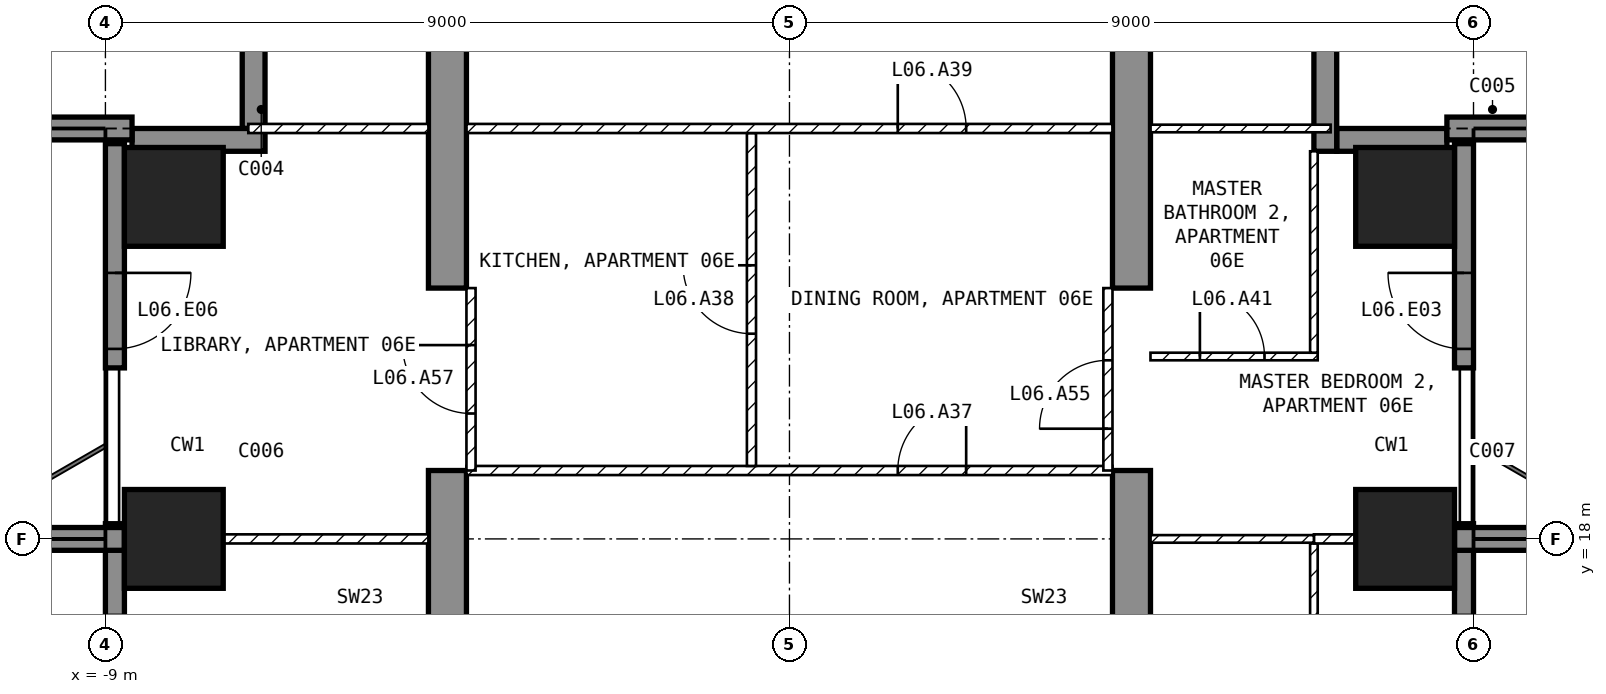
"""IFC4 building model, lengths in metres.
Left out: names, types, materials, properties, quantities, classifications, styles, units other than length and angle.
Written with IfcOpenShell. Run it as: python <this file> out.ifc"""

import sys

from ifc_helpers import new_model, si_unit, direction, frame, frame_2d, origin, origin_2d, place, context, subcontext, project, spatial, polyline, rectangle, outline, extrude, element, fill, save


model = new_model("IFC4")
c1 = context("Model", 3, precision=1e-05, world=origin(), true_north=direction((0.0, 1.0)))
c2 = subcontext(c1, "Body", "Model", "MODEL_VIEW")
j1 = project(units=[si_unit("LENGTHUNIT", "METRE"), si_unit("PLANEANGLEUNIT", "RADIAN")], contexts=[c1])
p1 = place(None, origin())
s1 = spatial("IfcSite", under=j1, at=p1, CompositionType="ELEMENT")
p2 = place(p1, origin())
s2 = spatial("IfcBuilding", under=s1, at=p2, CompositionType="ELEMENT")
p3 = place(p2, frame((0.0, 0.0, 40.0)))
s3 = spatial("IfcBuildingStorey", under=s2, at=p3, CompositionType="ELEMENT", Elevation=40.0)
for number, where, z_axis, x_axis in (
    (1, (-8.1, 18.0, -0.25), (0.0, 0.0, 1.0), (1.0, 0.0, 0.0)),
    (2, (-8.1, 22.5, -0.25), (0.0, 0.0, 1.0), (1.0, 0.0, 0.0)),
    (3, (8.1, 18.0, -0.25), (0.0, 0.0, 1.0), (1.0, 0.0, 0.0)),
    (4, (8.1, 22.5, -0.25), (0.0, 0.0, 1.0), (1.0, 0.0, 0.0)),
):
    element("IfcColumn", number, at=place(p3, frame(where, z_axis=z_axis, x_axis=x_axis)), inside=s3, PredefinedType="COLUMN", context=c2, shape_type="SweptSolid", body=[
        extrude(rectangle(XDim=1.3, YDim=1.3, at=origin_2d()), origin(), (0.0, 0.0, 1.0), 3.5),
    ])
for number, where, z_axis, x_axis in (
    (5, (-4.75, 9.0, -0.25), (1.0, 0.0, 0.0), (0.0, 1.0, 0.0)),
    (6, (4.25, 9.0, -0.25), (1.0, 0.0, 0.0), (0.0, 1.0, 0.0)),
):
    element("IfcWall", number, at=place(p3, frame(where, z_axis=z_axis, x_axis=x_axis)), inside=s3, PredefinedType="SHEAR", context=c2, shape_type="SweptSolid", body=[
        extrude(outline(polyline([(0.0, 0.0), (2.1, 0.0), (2.1, 2.65), (4.5, 2.65), (4.5, 0.0), (9.9, 0.0), (9.9, 2.65), (12.3, 2.65), (12.3, 0.0), (16.45, 0.0), (16.45, 3.5), (0.0, 3.5), (0.0, 0.0)])), origin(), (0.0, 0.0, 1.0), 0.5),
    ])
p4 = place(p3, frame((8.875, 15.55, 0.0), z_axis=(0.0, 0.0, 1.0), x_axis=(0.0, 1.0, 0.0)))
e7 = element("IfcWall", 7, at=p4, inside=s3, PredefinedType="SOLIDWALL", context=c2, shape_type="SweptSolid", body=[
    extrude(rectangle(XDim=2.65, YDim=0.25, at=frame_2d((1.325, 0.0))), origin(), (0.0, 0.0, 1.0), 3.25),
])
p5 = place(p4, frame((0.25, 0.0, 0.0)))
e8 = element("IfcOpeningElement", 8, at=p5, cuts=e7, PredefinedType="OPENING", context=c2, shape_type="SweptSolid", body=[
    extrude(rectangle(XDim=1.2, YDim=2.4, at=frame_2d((0.6, 1.2))), frame((0.0, 0.135, 0.0), z_axis=(0.0, -1.0, 0.0), x_axis=(1.0, 0.0, 0.0)), (0.0, 0.0, 1.0), 0.27),
])
p6 = place(p3, frame((8.875, 20.25, 0.0), z_axis=(0.0, 0.0, 1.0), x_axis=(0.0, 1.0, 0.0)))
e9 = element("IfcWall", 9, at=p6, inside=s3, PredefinedType="SOLIDWALL", context=c2, shape_type="SweptSolid", body=[
    extrude(rectangle(XDim=2.95, YDim=0.25, at=frame_2d((1.475, 0.0))), origin(), (0.0, 0.0, 1.0), 3.25),
])
p7 = place(p6, frame((0.25, 0.0, 0.0)))
e10 = element("IfcOpeningElement", 10, at=p7, cuts=e9, PredefinedType="OPENING", context=c2, shape_type="SweptSolid", body=[
    extrude(rectangle(XDim=1.0, YDim=2.4, at=frame_2d((0.5, 1.2))), frame((0.0, 0.135, 0.0), z_axis=(0.0, -1.0, 0.0), x_axis=(1.0, 0.0, 0.0)), (0.0, 0.0, 1.0), 0.27),
])
p8 = place(p3, frame((-8.875, 23.2, 0.0), z_axis=(0.0, 0.0, 1.0), x_axis=(0.0, -1.0, 0.0)))
e11 = element("IfcWall", 11, at=p8, inside=s3, PredefinedType="SOLIDWALL", context=c2, shape_type="SweptSolid", body=[
    extrude(rectangle(XDim=2.95, YDim=0.25, at=frame_2d((1.475, 0.0))), origin(), (0.0, 0.0, 1.0), 3.25),
])
p9 = place(p8, frame((1.7, 0.0, 0.0)))
e12 = element("IfcOpeningElement", 12, at=p9, cuts=e11, PredefinedType="OPENING", context=c2, shape_type="SweptSolid", body=[
    extrude(rectangle(XDim=1.0, YDim=2.4, at=frame_2d((0.5, 1.2))), frame((0.0, 0.135, 0.0), z_axis=(0.0, -1.0, 0.0), x_axis=(1.0, 0.0, 0.0)), (0.0, 0.0, 1.0), 0.27),
])
p10 = place(p3, frame((-8.875, 18.2, 0.0), z_axis=(0.0, 0.0, 1.0), x_axis=(0.0, -1.0, 0.0)))
e13 = element("IfcWall", 13, at=p10, inside=s3, PredefinedType="SOLIDWALL", context=c2, shape_type="SweptSolid", body=[
    extrude(rectangle(XDim=2.65, YDim=0.25, at=frame_2d((1.325, 0.0))), origin(), (0.0, 0.0, 1.0), 3.25),
])
p11 = place(p10, frame((1.2, 0.0, 0.0)))
e14 = element("IfcOpeningElement", 14, at=p11, cuts=e13, PredefinedType="OPENING", context=c2, shape_type="SweptSolid", body=[
    extrude(rectangle(XDim=1.2, YDim=2.4, at=frame_2d((0.6, 1.2))), frame((0.0, 0.135, 0.0), z_axis=(0.0, -1.0, 0.0), x_axis=(1.0, 0.0, 0.0)), (0.0, 0.0, 1.0), 0.27),
])
p12 = place(p3, frame((8.65, 23.25, 0.0), z_axis=(0.0, 0.0, 1.0), x_axis=(-1.0, 0.0, 0.0)))
e15 = element("IfcWall", 15, at=p12, inside=s3, PredefinedType="SOLIDWALL", context=c2, shape_type="SweptSolid", body=[
    extrude(rectangle(XDim=1.45, YDim=0.3, at=frame_2d((0.725, 0.0))), origin(), (0.0, 0.0, 1.0), 3.25),
])
p13 = place(p3, frame((7.05, 23.1, 0.0), z_axis=(0.0, 0.0, 1.0), x_axis=(0.0, 1.0, 0.0)))
e16 = element("IfcWall", 16, at=p13, inside=s3, PredefinedType="SOLIDWALL", context=c2, shape_type="SweptSolid", body=[
    extrude(rectangle(XDim=1.8, YDim=0.3, at=frame_2d((0.9, 0.0))), origin(), (0.0, 0.0, 1.0), 3.25),
])
p14 = place(p3, frame((-7.05, 25.2, 0.0), z_axis=(0.0, 0.0, 1.0), x_axis=(0.0, -1.0, 0.0)))
e17 = element("IfcWall", 17, at=p14, inside=s3, PredefinedType="SOLIDWALL", context=c2, shape_type="SweptSolid", body=[
    extrude(rectangle(XDim=1.8, YDim=0.3, at=frame_2d((0.9, 0.0))), origin(), (0.0, 0.0, 1.0), 3.25),
])
p15 = place(p3, frame((-6.9, 23.25, 0.0), z_axis=(0.0, 0.0, 1.0), x_axis=(-1.0, 0.0, 0.0)))
e18 = element("IfcWall", 18, at=p15, inside=s3, PredefinedType="SOLIDWALL", context=c2, shape_type="SweptSolid", body=[
    extrude(rectangle(XDim=1.75, YDim=0.3, at=frame_2d((0.875, 0.0))), origin(), (0.0, 0.0, 1.0), 3.25),
])
p16 = place(p3, frame((-8.75, 18.0, 0.0), z_axis=(0.0, 0.0, 1.0), x_axis=(-1.0, 0.0, 0.0)))
e19 = element("IfcWall", 19, at=p16, inside=s3, PredefinedType="SOLIDWALL", context=c2, shape_type="SweptSolid", body=[
    extrude(rectangle(XDim=2.95, YDim=0.3, at=frame_2d((1.475, 0.0))), origin(), (0.0, 0.0, 1.0), 3.25),
])
p17 = place(p3, frame((-8.65, 23.4, 0.0), z_axis=(0.0, 0.0, 1.0), x_axis=(-1.0, 0.0, 0.0)))
e20 = element("IfcWall", 20, at=p17, inside=s3, PredefinedType="SOLIDWALL", context=c2, shape_type="SweptSolid", body=[
    extrude(rectangle(XDim=3.05, YDim=0.3, at=frame_2d((1.525, 0.0))), origin(), (0.0, 0.0, 1.0), 3.25),
])
p18 = place(p3, frame((8.75, 18.0, 0.0), z_axis=(0.0, 0.0, 1.0), x_axis=(1.0, 0.0, 0.0)))
e21 = element("IfcWall", 21, at=p18, inside=s3, PredefinedType="SOLIDWALL", context=c2, shape_type="SweptSolid", body=[
    extrude(rectangle(XDim=2.95, YDim=0.3, at=frame_2d((1.475, 0.0))), origin(), (0.0, 0.0, 1.0), 3.25),
])
p19 = place(p3, frame((8.65, 23.4, 0.0), z_axis=(0.0, 0.0, 1.0), x_axis=(1.0, 0.0, 0.0)))
e22 = element("IfcWall", 22, at=p19, inside=s3, PredefinedType="SOLIDWALL", context=c2, shape_type="SweptSolid", body=[
    extrude(rectangle(XDim=3.05, YDim=0.3, at=frame_2d((1.525, 0.0))), origin(), (0.0, 0.0, 1.0), 3.25),
])
p20 = place(p3, frame((-4.25, 18.9, 0.0), z_axis=(0.0, 0.0, 1.0), x_axis=(1.0, 0.0, 0.0)))
e23 = element("IfcWall", 23, at=p20, inside=s3, PredefinedType="PARTITIONING", context=c2, shape_type="SweptSolid", body=[
    extrude(rectangle(XDim=8.5, YDim=0.12, at=frame_2d((4.25, 0.0))), origin(), (0.0, 0.0, 1.0), 3.25),
])
p21 = place(p20, frame((5.675, 0.0, 0.0)))
e24 = element("IfcOpeningElement", 24, at=p21, cuts=e23, PredefinedType="OPENING", context=c2, shape_type="SweptSolid", body=[
    extrude(rectangle(XDim=0.9, YDim=2.1, at=frame_2d((0.45, 1.05))), frame((0.0, 0.07, 0.0), z_axis=(0.0, -1.0, 0.0), x_axis=(1.0, 0.0, 0.0)), (0.0, 0.0, 1.0), 0.14),
])
p22 = place(p3, frame((-0.5, 18.96, 0.0), z_axis=(0.0, 0.0, 1.0), x_axis=(0.0, 1.0, 0.0)))
e25 = element("IfcWall", 25, at=p22, inside=s3, PredefinedType="PARTITIONING", context=c2, shape_type="SweptSolid", body=[
    extrude(rectangle(XDim=4.38, YDim=0.12, at=frame_2d((2.19, 0.0))), origin(), (0.0, 0.0, 1.0), 3.25),
])
p23 = place(p22, frame((1.74, 0.0, 0.0)))
e26 = element("IfcOpeningElement", 26, at=p23, cuts=e25, PredefinedType="OPENING", context=c2, shape_type="SweptSolid", body=[
    extrude(rectangle(XDim=0.9, YDim=2.1, at=frame_2d((0.45, 1.05))), frame((0.0, 0.07, 0.0), z_axis=(0.0, -1.0, 0.0), x_axis=(1.0, 0.0, 0.0)), (0.0, 0.0, 1.0), 0.14),
])
p24 = place(p3, frame((-4.25, 23.4, 0.0), z_axis=(0.0, 0.0, 1.0), x_axis=(1.0, 0.0, 0.0)))
e27 = element("IfcWall", 27, at=p24, inside=s3, PredefinedType="PARTITIONING", context=c2, shape_type="SweptSolid", body=[
    extrude(rectangle(XDim=8.5, YDim=0.12, at=frame_2d((4.25, 0.0))), origin(), (0.0, 0.0, 1.0), 3.25),
])
p25 = place(p24, frame((5.675, 0.0, 0.0)))
e28 = element("IfcOpeningElement", 28, at=p25, cuts=e27, PredefinedType="OPENING", context=c2, shape_type="SweptSolid", body=[
    extrude(rectangle(XDim=0.9, YDim=2.1, at=frame_2d((0.45, 1.05))), frame((0.0, 0.07, 0.0), z_axis=(0.0, -1.0, 0.0), x_axis=(1.0, 0.0, 0.0)), (0.0, 0.0, 1.0), 0.14),
])
p26 = place(p3, frame((6.9, 14.45, 0.0), z_axis=(0.0, 0.0, 1.0), x_axis=(0.0, 1.0, 0.0)))
e29 = element("IfcWall", 29, at=p26, inside=s3, PredefinedType="PARTITIONING", context=c2, shape_type="SweptSolid", body=[
    extrude(rectangle(XDim=3.49, YDim=0.1, at=frame_2d((1.745, 0.0))), origin(), (0.0, 0.0, 1.0), 3.25),
])
p27 = place(p3, frame((6.9, 18.0, 0.0), z_axis=(0.0, 0.0, 1.0), x_axis=(1.0, 0.0, 0.0)))
e30 = element("IfcWall", 30, at=p27, inside=s3, PredefinedType="PARTITIONING", context=c2, shape_type="SweptSolid", body=[
    extrude(rectangle(XDim=0.55, YDim=0.12, at=frame_2d((0.275, 0.0))), origin(), (0.0, 0.0, 1.0), 2.346),
])
p28 = place(p3, frame((4.75, 18.0, 0.0), z_axis=(0.0, 0.0, 1.0), x_axis=(1.0, 0.0, 0.0)))
e31 = element("IfcWall", 31, at=p28, inside=s3, PredefinedType="PARTITIONING", context=c2, shape_type="SweptSolid", body=[
    extrude(rectangle(XDim=2.15, YDim=0.1, at=frame_2d((1.075, 0.0))), origin(), (0.0, 0.0, 1.0), 2.346),
])
p29 = place(p3, frame((4.75, 20.4, 0.0), z_axis=(0.0, 0.0, 1.0), x_axis=(1.0, 0.0, 0.0)))
e32 = element("IfcWall", 32, at=p29, inside=s3, PredefinedType="PARTITIONING", context=c2, shape_type="SweptSolid", body=[
    extrude(rectangle(XDim=2.2, YDim=0.1, at=frame_2d((1.1, 0.0))), origin(), (0.0, 0.0, 1.0), 3.25),
])
p30 = place(p29, frame((0.65, 0.0, 0.0)))
e33 = element("IfcOpeningElement", 33, at=p30, cuts=e32, PredefinedType="OPENING", context=c2, shape_type="SweptSolid", body=[
    extrude(rectangle(XDim=0.85, YDim=2.1, at=frame_2d((0.425, 1.05))), frame((0.0, 0.06, 0.0), z_axis=(0.0, -1.0, 0.0), x_axis=(1.0, 0.0, 0.0)), (0.0, 0.0, 1.0), 0.12),
])
p31 = place(p3, frame((6.9, 20.45, 0.0), z_axis=(0.0, 0.0, 1.0), x_axis=(0.0, 1.0, 0.0)))
e34 = element("IfcWall", 34, at=p31, inside=s3, PredefinedType="PARTITIONING", context=c2, shape_type="SweptSolid", body=[
    extrude(rectangle(XDim=2.65, YDim=0.1, at=frame_2d((1.325, 0.0))), origin(), (0.0, 0.0, 1.0), 3.25),
])
p32 = place(p3, frame((4.75, 23.4, 0.0), z_axis=(0.0, 0.0, 1.0), x_axis=(1.0, 0.0, 0.0)))
e35 = element("IfcWall", 35, at=p32, inside=s3, PredefinedType="PARTITIONING", context=c2, shape_type="SweptSolid", body=[
    extrude(rectangle(XDim=2.37, YDim=0.1, at=frame_2d((1.185, 0.0))), origin(), (0.0, 0.0, 1.0), 3.25),
])
p33 = place(p3, frame((-7.45, 18.0, 0.0), z_axis=(0.0, 0.0, 1.0), x_axis=(1.0, 0.0, 0.0)))
e36 = element("IfcWall", 36, at=p33, inside=s3, PredefinedType="PARTITIONING", context=c2, shape_type="SweptSolid", body=[
    extrude(rectangle(XDim=2.7, YDim=0.12, at=frame_2d((1.35, 0.0))), origin(), (0.0, 0.0, 1.0), 2.346),
])
p34 = place(p3, frame((-7.12, 23.4, 0.0), z_axis=(0.0, 0.0, 1.0), x_axis=(1.0, 0.0, 0.0)))
e37 = element("IfcWall", 37, at=p34, inside=s3, PredefinedType="PARTITIONING", context=c2, shape_type="SweptSolid", body=[
    extrude(rectangle(XDim=2.37, YDim=0.12, at=frame_2d((1.185, 0.0))), origin(), (0.0, 0.0, 1.0), 3.25),
])
p35 = place(p3, frame((4.19, 18.9, 0.0), z_axis=(0.0, 0.0, 1.0), x_axis=(0.0, 1.0, 0.0)))
e38 = element("IfcWall", 38, at=p35, inside=s3, PredefinedType="PARTITIONING", context=c2, shape_type="SweptSolid", body=[
    extrude(rectangle(XDim=2.4, YDim=0.12, at=frame_2d((1.2, 0.0))), origin(), (0.0, 0.0, 1.0), 2.4),
])
p36 = place(p35, frame((0.55, 0.0, 0.0)))
e39 = element("IfcOpeningElement", 39, at=p36, cuts=e38, PredefinedType="OPENING", context=c2, shape_type="SweptSolid", body=[
    extrude(rectangle(XDim=0.9, YDim=2.1, at=frame_2d((0.45, 1.05))), frame((0.0, 0.07, 0.0), z_axis=(0.0, -1.0, 0.0), x_axis=(1.0, 0.0, 0.0)), (0.0, 0.0, 1.0), 0.14),
])
p37 = place(p3, frame((-4.19, 18.9, 0.0), z_axis=(0.0, 0.0, 1.0), x_axis=(0.0, 1.0, 0.0)))
e40 = element("IfcWall", 40, at=p37, inside=s3, PredefinedType="PARTITIONING", context=c2, shape_type="SweptSolid", body=[
    extrude(rectangle(XDim=2.4, YDim=0.12, at=frame_2d((1.2, 0.0))), origin(), (0.0, 0.0, 1.0), 2.4),
])
p38 = place(p37, frame((0.75, 0.0, 0.0)))
e41 = element("IfcOpeningElement", 41, at=p38, cuts=e40, PredefinedType="OPENING", context=c2, shape_type="SweptSolid", body=[
    extrude(rectangle(XDim=0.9, YDim=2.1, at=frame_2d((0.45, 1.05))), frame((0.0, 0.07, 0.0), z_axis=(0.0, -1.0, 0.0), x_axis=(1.0, 0.0, 0.0)), (0.0, 0.0, 1.0), 0.14),
])
p39 = place(p5, origin())
e42 = element("IfcDoor", 42, at=p39, inside=s3, OperationType="SINGLE_SWING_LEFT", PredefinedType="DOOR", context=c2, shape_type="SweptSolid", body=[
    extrude(rectangle(XDim=1.2, YDim=2.4, at=frame_2d((0.6, 1.2))), frame((0.0, 0.025, 0.0), z_axis=(0.0, -1.0, 0.0), x_axis=(1.0, 0.0, 0.0)), (0.0, 0.0, 1.0), 0.05),
])
fill(e8, e42)
p40 = place(p7, origin())
e43 = element("IfcDoor", 43, at=p40, inside=s3, OperationType="SINGLE_SWING_RIGHT", PredefinedType="DOOR", context=c2, shape_type="SweptSolid", body=[
    extrude(rectangle(XDim=1.0, YDim=2.4, at=frame_2d((0.5, 1.2))), frame((0.0, 0.025, 0.0), z_axis=(0.0, -1.0, 0.0), x_axis=(1.0, 0.0, 0.0)), (0.0, 0.0, 1.0), 0.05),
])
fill(e10, e43)
p41 = place(p9, origin())
e44 = element("IfcDoor", 44, at=p41, inside=s3, OperationType="SINGLE_SWING_LEFT", PredefinedType="DOOR", context=c2, shape_type="SweptSolid", body=[
    extrude(rectangle(XDim=1.0, YDim=2.4, at=frame_2d((0.5, 1.2))), frame((0.0, 0.025, 0.0), z_axis=(0.0, -1.0, 0.0), x_axis=(1.0, 0.0, 0.0)), (0.0, 0.0, 1.0), 0.05),
])
fill(e12, e44)
p42 = place(p21, origin())
e45 = element("IfcDoor", 45, at=p42, inside=s3, OperationType="SINGLE_SWING_RIGHT", PredefinedType="DOOR", context=c2, shape_type="SweptSolid", body=[
    extrude(rectangle(XDim=0.9, YDim=2.1, at=frame_2d((0.45, 1.05))), frame((0.0, 0.025, 0.0), z_axis=(0.0, -1.0, 0.0), x_axis=(1.0, 0.0, 0.0)), (0.0, 0.0, 1.0), 0.05),
])
fill(e24, e45)
p43 = place(p23, origin())
e46 = element("IfcDoor", 46, at=p43, inside=s3, OperationType="SINGLE_SWING_RIGHT", PredefinedType="DOOR", context=c2, shape_type="SweptSolid", body=[
    extrude(rectangle(XDim=0.9, YDim=2.1, at=frame_2d((0.45, 1.05))), frame((0.0, 0.025, 0.0), z_axis=(0.0, -1.0, 0.0), x_axis=(1.0, 0.0, 0.0)), (0.0, 0.0, 1.0), 0.05),
])
fill(e26, e46)
p44 = place(p25, origin())
e47 = element("IfcDoor", 47, at=p44, inside=s3, OperationType="SINGLE_SWING_LEFT", PredefinedType="DOOR", context=c2, shape_type="SweptSolid", body=[
    extrude(rectangle(XDim=0.9, YDim=2.1, at=frame_2d((0.45, 1.05))), frame((0.0, 0.025, 0.0), z_axis=(0.0, -1.0, 0.0), x_axis=(1.0, 0.0, 0.0)), (0.0, 0.0, 1.0), 0.05),
])
fill(e28, e47)
p45 = place(p30, origin())
e48 = element("IfcDoor", 48, at=p45, inside=s3, OperationType="SINGLE_SWING_LEFT", PredefinedType="DOOR", context=c2, shape_type="SweptSolid", body=[
    extrude(rectangle(XDim=0.85, YDim=2.1, at=frame_2d((0.425, 1.05))), frame((0.0, 0.025, 0.0), z_axis=(0.0, -1.0, 0.0), x_axis=(1.0, 0.0, 0.0)), (0.0, 0.0, 1.0), 0.05),
])
fill(e33, e48)
p46 = place(p36, origin())
e49 = element("IfcDoor", 49, at=p46, inside=s3, OperationType="SINGLE_SWING_LEFT", PredefinedType="DOOR", context=c2, shape_type="SweptSolid", body=[
    extrude(rectangle(XDim=0.9, YDim=2.1, at=frame_2d((0.45, 1.05))), frame((0.0, 0.025, 0.0), z_axis=(0.0, -1.0, 0.0), x_axis=(1.0, 0.0, 0.0)), (0.0, 0.0, 1.0), 0.05),
])
fill(e39, e49)
p47 = place(p38, origin())
e50 = element("IfcDoor", 50, at=p47, inside=s3, OperationType="SINGLE_SWING_RIGHT", PredefinedType="DOOR", context=c2, shape_type="SweptSolid", body=[
    extrude(rectangle(XDim=0.9, YDim=2.1, at=frame_2d((0.45, 1.05))), frame((0.0, 0.025, 0.0), z_axis=(0.0, -1.0, 0.0), x_axis=(1.0, 0.0, 0.0)), (0.0, 0.0, 1.0), 0.05),
])
fill(e41, e50)
save(model, sys.argv[1])
